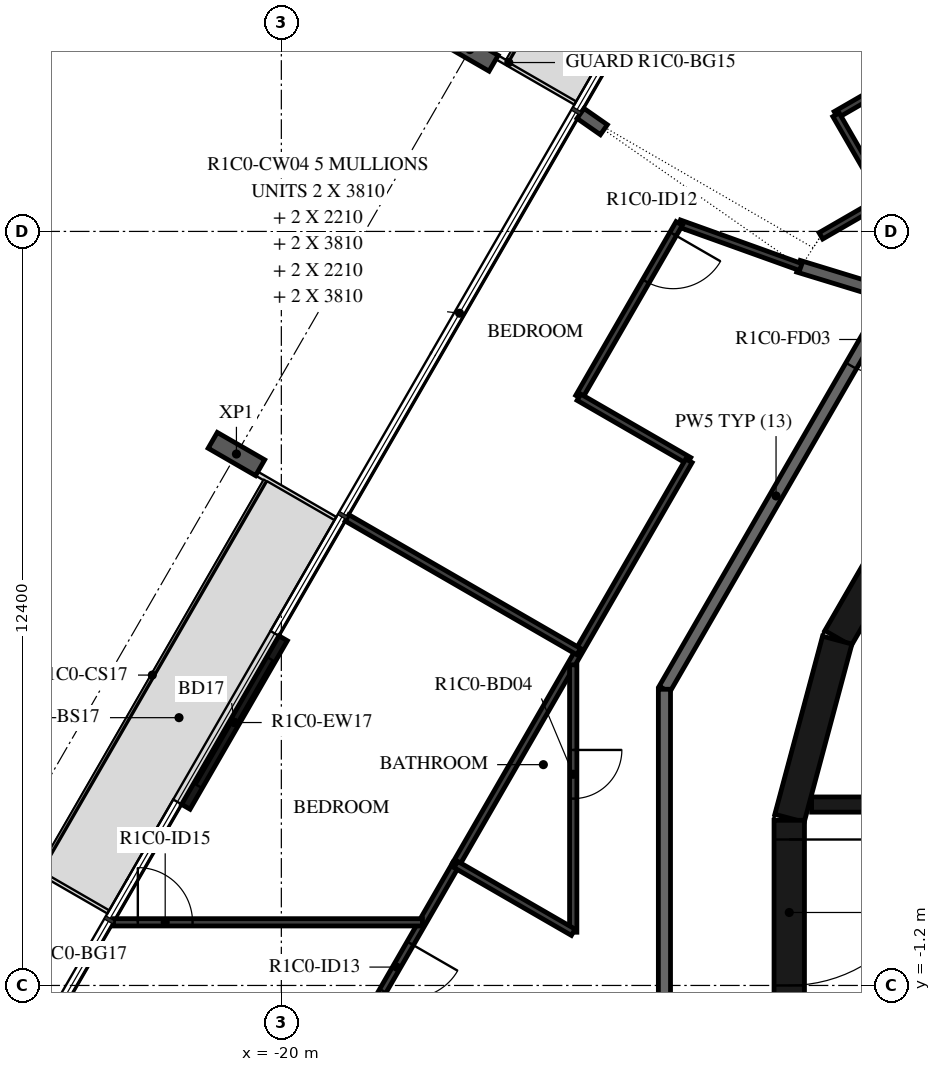
"""IFC4 building model, lengths in metres.
Left out: names, types, materials, properties, quantities, classifications, styles, units other than length and angle.
Written with IfcOpenShell. Run it as: python <this file> out.ifc"""

import sys

from ifc_helpers import new_model, si_unit, direction, frame, frame_2d, origin, origin_2d, place, context, subcontext, project, spatial, rectangle, i_section, extrude, element, fill, save


model = new_model("IFC4")
c1 = context("Model", 3, precision=1e-05, world=origin(), true_north=direction((0.0, 1.0)))
c2 = subcontext(c1, "Body", "Model", "MODEL_VIEW")
j1 = project(units=[si_unit("LENGTHUNIT", "METRE"), si_unit("PLANEANGLEUNIT", "RADIAN")], contexts=[c1])
p1 = place(None, origin())
s1 = spatial("IfcSite", under=j1, at=p1, CompositionType="ELEMENT")
p2 = place(p1, origin())
s2 = spatial("IfcBuilding", under=s1, at=p2, CompositionType="ELEMENT")
p3 = place(p2, frame((0.0, 0.0, 66.4)))
s3 = spatial("IfcBuildingStorey", under=s2, at=p3, CompositionType="ELEMENT", Elevation=66.4)
for number, where, z_axis, x_axis in (
    (1, (-16.899, 14.19, -0.38), (0.0, 0.0, 1.0), (0.5, 0.866, 0.0)),
    (2, (-20.739, 7.539, -0.38), (0.0, 0.0, 1.0), (0.5, 0.866, 0.0)),
):
    element("IfcColumn", number, at=place(p3, frame(where, z_axis=z_axis, x_axis=x_axis)), inside=s3, PredefinedType="COLUMN", context=c2, shape_type="SweptSolid", body=[
        extrude(i_section(OverallWidth=0.3, OverallDepth=0.9, WebThickness=0.019, FlangeThickness=0.035, FilletRadius=0.03, at=origin_2d()), origin(), (0.0, 0.0, 1.0), 2.616),
    ])
p4 = place(p3, frame((-19.971, 4.51, 0.0), z_axis=(0.0, 0.0, 1.0), x_axis=(-0.500028443584, -0.866008981251, 0.0)))
e3 = element("IfcWall", 3, at=p4, inside=s3, PredefinedType="STANDARD", context=c2, shape_type="SweptSolid", body=[
    extrude(rectangle(XDim=3.2, YDim=0.16, at=frame_2d((1.6, 0.0))), origin(), (0.0, 0.0, 1.0), 3.05),
])
p5 = place(p4, frame((0.4, 0.0, 0.0)))
e4 = element("IfcOpeningElement", 4, at=p5, cuts=e3, PredefinedType="OPENING", context=c2, shape_type="SweptSolid", body=[
    extrude(rectangle(XDim=2.4, YDim=2.4, at=frame_2d((1.2, 1.2))), frame((0.0, 0.09, 0.0), z_axis=(0.0, -1.0, 0.0), x_axis=(1.0, 0.0, 0.0)), (0.0, 0.0, 1.0), 0.18),
])
for number, where, z_axis, x_axis in (
    (5, (-9.329, 7.137, 0.0), (0.0, 0.0, 1.0), (-0.5, -0.866, 0.0)),
    (6, (-10.858, 4.479, 0.0), (0.0, 0.0, 1.0), (-0.259, -0.966, 0.0)),
):
    element("IfcWall", number, at=place(p3, frame(where, z_axis=z_axis, x_axis=x_axis)), inside=s3, PredefinedType="SHEAR", context=c2, shape_type="SweptSolid", body=[
        extrude(rectangle(XDim=3.033, YDim=0.5, at=frame_2d((1.516, 0.0))), origin(), (0.0, 0.0, 1.0), 3.05),
    ])
p6 = place(p3, frame((-11.647, 1.516, 0.0), z_axis=(0.0, 0.0, 1.0), x_axis=(0.0, -1.0, 0.0)))
e7 = element("IfcWall", 7, at=p6, inside=s3, PredefinedType="SHEAR", context=c2, shape_type="SweptSolid", body=[
    extrude(rectangle(XDim=3.033, YDim=0.5, at=frame_2d((1.516, 0.0))), origin(), (0.0, 0.0, 1.0), 3.05),
])
p7 = place(p6, frame((0.316, 0.0, 0.0)))
e8 = element("IfcOpeningElement", 8, at=p7, cuts=e7, PredefinedType="OPENING", context=c2, shape_type="SweptSolid", body=[
    extrude(rectangle(XDim=2.4, YDim=2.1, at=frame_2d((1.2, 1.05))), frame((0.0, 0.26, 0.0), z_axis=(0.0, -1.0, 0.0), x_axis=(1.0, 0.0, 0.0)), (0.0, 0.0, 1.0), 0.52),
])
p8 = place(p3, frame((-11.28, 1.775, 0.0), z_axis=(0.0, 0.0, 1.0), x_axis=(1.0, 0.0, 0.0)))
e9 = element("IfcWall", 9, at=p8, inside=s3, PredefinedType="SHEAR", context=c2, shape_type="SweptSolid", body=[
    extrude(rectangle(XDim=14.38, YDim=0.25, at=frame_2d((7.19, 0.0))), origin(), (0.0, 0.0, 1.0), 3.05),
])
p9 = place(p8, frame((2.13, 0.0, 0.0)))
e10 = element("IfcOpeningElement", 10, at=p9, cuts=e9, PredefinedType="OPENING", context=c2, shape_type="SweptSolid", body=[
    extrude(rectangle(XDim=1.1, YDim=2.1, at=frame_2d((0.55, 1.05))), frame((0.0, 0.135, 0.0), z_axis=(0.0, -1.0, 0.0), x_axis=(1.0, 0.0, 0.0)), (0.0, 0.0, 1.0), 0.27),
])
p10 = place(p8, frame((4.28, 0.0, 0.0)))
e11 = element("IfcOpeningElement", 11, at=p10, cuts=e9, PredefinedType="OPENING", context=c2, shape_type="SweptSolid", body=[
    extrude(rectangle(XDim=1.1, YDim=2.1, at=frame_2d((0.55, 1.05))), frame((0.0, 0.135, 0.0), z_axis=(0.0, -1.0, 0.0), x_axis=(1.0, 0.0, 0.0)), (0.0, 0.0, 1.0), 0.27),
])
p11 = place(p8, frame((6.43, 0.0, 0.0)))
e12 = element("IfcOpeningElement", 12, at=p11, cuts=e9, PredefinedType="OPENING", context=c2, shape_type="SweptSolid", body=[
    extrude(rectangle(XDim=1.1, YDim=2.1, at=frame_2d((0.55, 1.05))), frame((0.0, 0.135, 0.0), z_axis=(0.0, -1.0, 0.0), x_axis=(1.0, 0.0, 0.0)), (0.0, 0.0, 1.0), 0.27),
])
p12 = place(p8, frame((8.58, 0.0, 0.0)))
e13 = element("IfcOpeningElement", 13, at=p12, cuts=e9, PredefinedType="OPENING", context=c2, shape_type="SweptSolid", body=[
    extrude(rectangle(XDim=1.1, YDim=2.1, at=frame_2d((0.55, 1.05))), frame((0.0, 0.135, 0.0), z_axis=(0.0, -1.0, 0.0), x_axis=(1.0, 0.0, 0.0)), (0.0, 0.0, 1.0), 0.27),
])
p13 = place(p8, frame((11.905, 0.0, 0.0)))
e14 = element("IfcOpeningElement", 14, at=p13, cuts=e9, PredefinedType="OPENING", context=c2, shape_type="SweptSolid", body=[
    extrude(rectangle(XDim=0.9, YDim=2.1, at=frame_2d((0.45, 1.05))), frame((0.0, 0.135, 0.0), z_axis=(0.0, -1.0, 0.0), x_axis=(1.0, 0.0, 0.0)), (0.0, 0.0, 1.0), 0.27),
])
p14 = place(p3, frame((-10.029, 10.029, 0.0), z_axis=(0.0, 0.0, 1.0), x_axis=(-0.500001669485, -0.866024439905, 0.0)))
e15 = element("IfcWall", 15, at=p14, inside=s3, PredefinedType="STANDARD", context=c2, shape_type="SweptSolid", body=[
    extrude(rectangle(XDim=7.342, YDim=0.2, at=frame_2d((3.671, 0.0))), origin(), (0.0, 0.0, 1.0), 3.05),
])
p15 = place(p14, frame((0.2, 0.0, 0.0)))
e16 = element("IfcOpeningElement", 16, at=p15, cuts=e15, PredefinedType="OPENING", context=c2, shape_type="SweptSolid", body=[
    extrude(rectangle(XDim=1.0, YDim=2.1, at=frame_2d((0.5, 1.05))), frame((0.0, 0.11, 0.0), z_axis=(0.0, -1.0, 0.0), x_axis=(1.0, 0.0, 0.0)), (0.0, 0.0, 1.0), 0.22),
])
p16 = place(p3, frame((-13.7, 3.671, 0.0), z_axis=(0.0, 0.0, 1.0), x_axis=(0.0, -1.0, 0.0)))
e17 = element("IfcWall", 17, at=p16, inside=s3, PredefinedType="STANDARD", context=c2, shape_type="SweptSolid", body=[
    extrude(rectangle(XDim=7.342, YDim=0.2, at=frame_2d((3.671, 0.0))), origin(), (0.0, 0.0, 1.0), 3.05),
])
p17 = place(p3, frame((-11.496, 10.627, 0.0), z_axis=(0.0, 0.0, 1.0), x_axis=(0.956240708563, -0.292581112321, 0.0)))
e18 = element("IfcWall", 18, at=p17, inside=s3, PredefinedType="STANDARD", context=c2, shape_type="SweptSolid", body=[
    extrude(rectangle(XDim=1.711, YDim=0.2, at=frame_2d((0.855, 0.0))), origin(), (0.0, 0.0, 1.0), 3.05),
])
p18 = place(p3, frame((-15.08, 13.14, 0.0), z_axis=(0.0, 0.0, 1.0), x_axis=(0.820309143391, -0.571920369692, 0.0)))
e19 = element("IfcWall", 19, at=p18, inside=s3, PredefinedType="STANDARD", context=c2, shape_type="SweptSolid", body=[
    extrude(rectangle(XDim=0.468, YDim=0.2, at=frame_2d((0.234, 0.0))), origin(), (0.0, 0.0, 1.0), 3.05),
])
p19 = place(p3, frame((-9.406, 13.969, 0.0), z_axis=(0.0, 0.0, 1.0), x_axis=(-0.865989465428, -0.500062241894, 0.0)))
e20 = element("IfcWall", 20, at=p19, inside=s3, PredefinedType="PARTITIONING", context=c2, shape_type="SweptSolid", body=[
    extrude(rectangle(XDim=1.7, YDim=0.12, at=frame_2d((0.85, 0.0))), origin(), (0.0, 0.0, 1.0), 3.05),
])
p20 = place(p3, frame((-10.878, 13.118, 0.0), z_axis=(0.0, 0.0, 1.0), x_axis=(0.500061482766, -0.865989903783, 0.0)))
e21 = element("IfcWall", 21, at=p20, inside=s3, PredefinedType="PARTITIONING", context=c2, shape_type="SweptSolid", body=[
    extrude(rectangle(XDim=1.6, YDim=0.12, at=frame_2d((0.8, 0.0))), origin(), (0.0, 0.0, 1.0), 3.05),
])
p21 = place(p3, frame((-10.078, 11.733, 0.0), z_axis=(0.0, 0.0, 1.0), x_axis=(-0.866014416983, -0.500019029215, 0.0)))
e22 = element("IfcWall", 22, at=p21, inside=s3, PredefinedType="PARTITIONING", context=c2, shape_type="SweptSolid", body=[
    extrude(rectangle(XDim=1.211, YDim=0.12, at=frame_2d((0.606, 0.0))), origin(), (0.0, 0.0, 1.0), 3.05),
])
p22 = place(p3, frame((-11.458, 10.614, 0.0), z_axis=(0.0, 0.0, 1.0), x_axis=(-0.941092440198, 0.338149403375, 0.0)))
e23 = element("IfcWall", 23, at=p22, inside=s3, PredefinedType="PARTITIONING", context=c2, shape_type="SweptSolid", body=[
    extrude(rectangle(XDim=2.123, YDim=0.12, at=frame_2d((1.062, 0.0))), origin(), (0.0, 0.0, 1.0), 3.05),
])
p23 = place(p3, frame((-13.457, 11.332, 0.0), z_axis=(0.0, 0.0, 1.0), x_axis=(-0.499974350878, -0.866040211805, 0.0)))
e24 = element("IfcWall", 24, at=p23, inside=s3, PredefinedType="PARTITIONING", context=c2, shape_type="SweptSolid", body=[
    extrude(rectangle(XDim=3.3, YDim=0.12, at=frame_2d((1.65, 0.0))), origin(), (0.0, 0.0, 1.0), 3.05),
])
p24 = place(p23, frame((0.2, 0.0, 0.0)))
e25 = element("IfcOpeningElement", 25, at=p24, cuts=e24, PredefinedType="OPENING", context=c2, shape_type="SweptSolid", body=[
    extrude(rectangle(XDim=0.9, YDim=2.1, at=frame_2d((0.45, 1.05))), frame((0.0, 0.07, 0.0), z_axis=(0.0, -1.0, 0.0), x_axis=(1.0, 0.0, 0.0)), (0.0, 0.0, 1.0), 0.14),
])
p25 = place(p3, frame((-15.106, 8.474, 0.0), z_axis=(0.0, 0.0, 1.0), x_axis=(0.866041603473, -0.499971940267, 0.0)))
e26 = element("IfcWall", 26, at=p25, inside=s3, PredefinedType="PARTITIONING", context=c2, shape_type="SweptSolid", body=[
    extrude(rectangle(XDim=2.089, YDim=0.12, at=frame_2d((1.045, 0.0))), origin(), (0.0, 0.0, 1.0), 3.05),
])
p26 = place(p3, frame((-13.297, 7.429, 0.0), z_axis=(0.0, 0.0, 1.0), x_axis=(-0.49999903102, -0.866025963225, 0.0)))
e27 = element("IfcWall", 27, at=p26, inside=s3, PredefinedType="PARTITIONING", context=c2, shape_type="SweptSolid", body=[
    extrude(rectangle(XDim=7.667, YDim=0.12, at=frame_2d((3.833, 0.0))), origin(), (0.0, 0.0, 1.0), 3.05),
])
p27 = place(p3, frame((-17.13, 0.79, 0.0), z_axis=(0.0, 0.0, 1.0), x_axis=(-0.499997052475, -0.866027105532, 0.0)))
e28 = element("IfcWall", 28, at=p27, inside=s3, PredefinedType="PARTITIONING", context=c2, shape_type="SweptSolid", body=[
    extrude(rectangle(XDim=12.006, YDim=0.12, at=frame_2d((6.003, 0.0))), origin(), (0.0, 0.0, 1.0), 3.05),
])
p28 = place(p27, frame((1.498, 0.0, 0.0)))
e29 = element("IfcOpeningElement", 29, at=p28, cuts=e28, PredefinedType="OPENING", context=c2, shape_type="SweptSolid", body=[
    extrude(rectangle(XDim=0.9, YDim=2.1, at=frame_2d((0.45, 1.05))), frame((0.0, 0.07, 0.0), z_axis=(0.0, -1.0, 0.0), x_axis=(1.0, 0.0, 0.0)), (0.0, 0.0, 1.0), 0.14),
])
p29 = place(p3, frame((-15.2, 4.073, 0.0), z_axis=(0.0, 0.0, 1.0), x_axis=(0.0, -1.0, 0.0)))
e30 = element("IfcWall", 30, at=p29, inside=s3, PredefinedType="PARTITIONING", context=c2, shape_type="SweptSolid", body=[
    extrude(rectangle(XDim=4.398, YDim=0.12, at=frame_2d((2.199, 0.0))), origin(), (0.0, 0.0, 1.0), 3.05),
])
p30 = place(p29, frame((1.4, 0.0, 0.0)))
e31 = element("IfcOpeningElement", 31, at=p30, cuts=e30, PredefinedType="OPENING", context=c2, shape_type="SweptSolid", body=[
    extrude(rectangle(XDim=0.8, YDim=2.1, at=frame_2d((0.4, 1.05))), frame((0.0, 0.07, 0.0), z_axis=(0.0, -1.0, 0.0), x_axis=(1.0, 0.0, 0.0)), (0.0, 0.0, 1.0), 0.14),
])
p31 = place(p3, frame((-15.2, -0.325, 0.0), z_axis=(0.0, 0.0, 1.0), x_axis=(-0.866003168561, 0.500038510559, 0.0)))
e32 = element("IfcWall", 32, at=p31, inside=s3, PredefinedType="PARTITIONING", context=c2, shape_type="SweptSolid", body=[
    extrude(rectangle(XDim=2.229, YDim=0.12, at=frame_2d((1.114, 0.0))), origin(), (0.0, 0.0, 1.0), 3.05),
])
p32 = place(p3, frame((-18.92, 6.49, 0.0), z_axis=(0.0, 0.0, 1.0), x_axis=(0.865994303029, -0.500053864221, 0.0)))
e33 = element("IfcWall", 33, at=p32, inside=s3, PredefinedType="PARTITIONING", context=c2, shape_type="SweptSolid", body=[
    extrude(rectangle(XDim=4.4, YDim=0.12, at=frame_2d((2.2, 0.0))), origin(), (0.0, 0.0, 1.0), 3.05),
])
p33 = place(p3, frame((-22.76, -0.162, 0.0), z_axis=(0.0, 0.0, 1.0), x_axis=(1.0, 0.0, 0.0)))
e34 = element("IfcWall", 34, at=p33, inside=s3, PredefinedType="PARTITIONING", context=c2, shape_type="SweptSolid", body=[
    extrude(rectangle(XDim=5.081, YDim=0.12, at=frame_2d((2.54, 0.0))), origin(), (0.0, 0.0, 1.0), 3.05),
])
p34 = place(p33, frame((0.4, 0.0, 0.0)))
e35 = element("IfcOpeningElement", 35, at=p34, cuts=e34, PredefinedType="OPENING", context=c2, shape_type="SweptSolid", body=[
    extrude(rectangle(XDim=0.9, YDim=2.1, at=frame_2d((0.45, 1.05))), frame((0.0, 0.07, 0.0), z_axis=(0.0, -1.0, 0.0), x_axis=(1.0, 0.0, 0.0)), (0.0, 0.0, 1.0), 0.14),
])
p35 = place(p5, origin())
e36 = element("IfcDoor", 36, at=p35, inside=s3, OperationType="DOUBLE_DOOR_SLIDING", PredefinedType="DOOR", context=c2, shape_type="SweptSolid", body=[
    extrude(rectangle(XDim=2.4, YDim=2.4, at=frame_2d((1.2, 1.2))), frame((0.0, 0.025, 0.0), z_axis=(0.0, -1.0, 0.0), x_axis=(1.0, 0.0, 0.0)), (0.0, 0.0, 1.0), 0.05),
])
fill(e4, e36)
p36 = place(p7, origin())
e37 = element("IfcDoor", 37, at=p36, inside=s3, OperationType="DOUBLE_DOOR_SINGLE_SWING", PredefinedType="DOOR", context=c2, shape_type="SweptSolid", body=[
    extrude(rectangle(XDim=2.4, YDim=2.1, at=frame_2d((1.2, 1.05))), frame((0.0, 0.025, 0.0), z_axis=(0.0, -1.0, 0.0), x_axis=(1.0, 0.0, 0.0)), (0.0, 0.0, 1.0), 0.05),
])
fill(e8, e37)
p37 = place(p15, origin())
e38 = element("IfcDoor", 38, at=p37, inside=s3, OperationType="SINGLE_SWING_LEFT", PredefinedType="DOOR", context=c2, shape_type="SweptSolid", body=[
    extrude(rectangle(XDim=1.0, YDim=2.1, at=frame_2d((0.5, 1.05))), frame((0.0, 0.025, 0.0), z_axis=(0.0, -1.0, 0.0), x_axis=(1.0, 0.0, 0.0)), (0.0, 0.0, 1.0), 0.05),
])
fill(e16, e38)
p38 = place(p24, origin())
e39 = element("IfcDoor", 39, at=p38, inside=s3, OperationType="SINGLE_SWING_LEFT", PredefinedType="DOOR", context=c2, shape_type="SweptSolid", body=[
    extrude(rectangle(XDim=0.9, YDim=2.1, at=frame_2d((0.45, 1.05))), frame((0.0, 0.025, 0.0), z_axis=(0.0, -1.0, 0.0), x_axis=(1.0, 0.0, 0.0)), (0.0, 0.0, 1.0), 0.05),
])
fill(e25, e39)
p39 = place(p30, origin())
e40 = element("IfcDoor", 40, at=p39, inside=s3, OperationType="SINGLE_SWING_RIGHT", PredefinedType="DOOR", context=c2, shape_type="SweptSolid", body=[
    extrude(rectangle(XDim=0.8, YDim=2.1, at=frame_2d((0.4, 1.05))), frame((0.0, 0.025, 0.0), z_axis=(0.0, -1.0, 0.0), x_axis=(1.0, 0.0, 0.0)), (0.0, 0.0, 1.0), 0.05),
])
fill(e31, e40)
p40 = place(p28, origin())
e41 = element("IfcDoor", 41, at=p40, inside=s3, OperationType="SINGLE_SWING_RIGHT", PredefinedType="DOOR", context=c2, shape_type="SweptSolid", body=[
    extrude(rectangle(XDim=0.9, YDim=2.1, at=frame_2d((0.45, 1.05))), frame((0.0, 0.025, 0.0), z_axis=(0.0, -1.0, 0.0), x_axis=(1.0, 0.0, 0.0)), (0.0, 0.0, 1.0), 0.05),
])
fill(e29, e41)
p41 = place(p34, origin())
e42 = element("IfcDoor", 42, at=p41, inside=s3, OperationType="SINGLE_SWING_LEFT", PredefinedType="DOOR", context=c2, shape_type="SweptSolid", body=[
    extrude(rectangle(XDim=0.9, YDim=2.1, at=frame_2d((0.45, 1.05))), frame((0.0, 0.025, 0.0), z_axis=(0.0, -1.0, 0.0), x_axis=(1.0, 0.0, 0.0)), (0.0, 0.0, 1.0), 0.05),
])
fill(e35, e42)
save(model, sys.argv[1])
